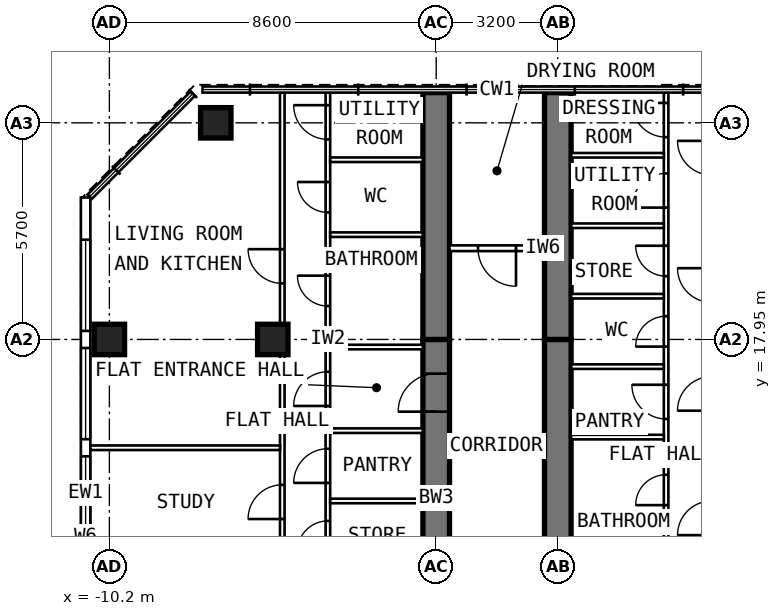
"""IFC4 building model, lengths in metres.
Left out: names, types, materials, properties, quantities, classifications, styles, units other than length and angle.
Written with IfcOpenShell. Run it as: python <this file> out.ifc"""

import sys

from ifc_helpers import new_model, si_unit, direction, frame, frame_2d, origin, origin_2d, place, context, subcontext, project, spatial, rectangle, extrude, element, fill, save


model = new_model("IFC4")
c1 = context("Model", 3, precision=1e-05, world=origin(), true_north=direction((0.0, 1.0)))
c2 = subcontext(c1, "Body", "Model", "MODEL_VIEW")
j1 = project(units=[si_unit("LENGTHUNIT", "METRE"), si_unit("PLANEANGLEUNIT", "RADIAN")], contexts=[c1])
p1 = place(None, origin())
s1 = spatial("IfcSite", under=j1, at=p1, CompositionType="ELEMENT")
p2 = place(p1, origin())
s2 = spatial("IfcBuilding", under=s1, at=p2, CompositionType="ELEMENT")
p3 = place(p2, frame((0.0, 0.0, 278.2)))
s3 = spatial("IfcBuildingStorey", under=s2, at=p3, CompositionType="ELEMENT", Elevation=278.2)
for number, where, z_axis, x_axis in (
    (1, (-10.2, 17.95, 0.0), (0.0, 0.0, 1.0), (0.0, 1.0, 0.0)),
    (2, (-7.4, 23.65, 0.0), (0.0, 0.0, 1.0), (0.0, 1.0, 0.0)),
    (3, (-5.9, 17.95, 0.0), (0.0, 0.0, 1.0), (0.0, 1.0, 0.0)),
):
    element("IfcColumn", number, at=place(p3, frame(where, z_axis=z_axis, x_axis=x_axis)), inside=s3, PredefinedType="COLUMN", context=c2, shape_type="SweptSolid", body=[
        extrude(rectangle(XDim=0.8, YDim=0.8, at=origin_2d()), origin(), (0.0, 0.0, 1.0), 3.6),
    ])
p4 = place(p3, frame((-1.6, 9.6, 0.0), z_axis=(0.0, 0.0, 1.0), x_axis=(0.0, 1.0, 0.0)))
e4 = element("IfcWall", 4, at=p4, inside=s3, PredefinedType="SHEAR", context=c2, shape_type="SweptSolid", body=[
    extrude(rectangle(XDim=8.35, YDim=0.7, at=frame_2d((4.175, 0.0))), origin(), (0.0, 0.0, 1.0), 3.6),
])
p5 = place(p4, frame((6.45, 0.0, 0.0)))
e5 = element("IfcOpeningElement", 5, at=p5, cuts=e4, PredefinedType="OPENING", context=c2, shape_type="SweptSolid", body=[
    extrude(rectangle(XDim=1.0, YDim=2.1, at=frame_2d((0.5, 1.05))), frame((0.0, 0.362, 0.0), z_axis=(0.0, -1.0, 0.0), x_axis=(1.0, 0.0, 0.0)), (0.0, 0.0, 1.0), 0.724),
])
p6 = place(p3, frame((-1.6, 17.95, 0.0), z_axis=(0.0, 0.0, 1.0), x_axis=(0.0, 1.0, 0.0)))
e6 = element("IfcWall", 6, at=p6, inside=s3, PredefinedType="SHEAR", context=c2, shape_type="SweptSolid", body=[
    extrude(rectangle(XDim=6.495, YDim=0.7, at=frame_2d((3.248, 0.0))), origin(), (0.0, 0.0, 1.0), 3.6),
])
p7 = place(p3, frame((1.6, 9.6, 0.0), z_axis=(0.0, 0.0, 1.0), x_axis=(0.0, 1.0, 0.0)))
e7 = element("IfcWall", 7, at=p7, inside=s3, PredefinedType="SHEAR", context=c2, shape_type="SweptSolid", body=[
    extrude(rectangle(XDim=8.35, YDim=0.7, at=frame_2d((4.175, 0.0))), origin(), (0.0, 0.0, 1.0), 3.6),
])
p8 = place(p7, frame((1.3, 0.0, 0.0)))
e8 = element("IfcOpeningElement", 8, at=p8, cuts=e7, PredefinedType="OPENING", context=c2, shape_type="SweptSolid", body=[
    extrude(rectangle(XDim=1.0, YDim=2.1, at=frame_2d((0.5, 1.05))), frame((0.0, 0.362, 0.0), z_axis=(0.0, -1.0, 0.0), x_axis=(1.0, 0.0, 0.0)), (0.0, 0.0, 1.0), 0.724),
])
p9 = place(p3, frame((1.6, 17.95, 0.0), z_axis=(0.0, 0.0, 1.0), x_axis=(0.0, 1.0, 0.0)))
e9 = element("IfcWall", 9, at=p9, inside=s3, PredefinedType="SHEAR", context=c2, shape_type="SweptSolid", body=[
    extrude(rectangle(XDim=6.495, YDim=0.7, at=frame_2d((3.248, 0.0))), origin(), (0.0, 0.0, 1.0), 3.6),
])
p10 = place(p3, frame((-10.825, 6.148, 0.0), z_axis=(0.0, 0.0, 1.0), x_axis=(0.0, 1.0, 0.0)))
e10 = element("IfcWall", 10, at=p10, inside=s3, PredefinedType="SOLIDWALL", context=c2, shape_type="SweptSolid", body=[
    extrude(rectangle(XDim=15.537, YDim=0.25, at=frame_2d((7.769, 0.0))), origin(), (0.0, 0.0, 1.0), 3.35),
])
p11 = place(p10, frame((0.627, 0.0, 0.6)))
e11 = element("IfcOpeningElement", 11, at=p11, cuts=e10, PredefinedType="OPENING", context=c2, shape_type="SweptSolid", body=[
    extrude(rectangle(XDim=2.4, YDim=2.0, at=frame_2d((1.2, 1.0))), frame((0.0, 0.137, 0.0), z_axis=(0.0, -1.0, 0.0), x_axis=(1.0, 0.0, 0.0)), (0.0, 0.0, 1.0), 0.274),
])
p12 = place(p10, frame((3.477, 0.0, 0.6)))
e12 = element("IfcOpeningElement", 12, at=p12, cuts=e10, PredefinedType="OPENING", context=c2, shape_type="SweptSolid", body=[
    extrude(rectangle(XDim=2.4, YDim=2.0, at=frame_2d((1.2, 1.0))), frame((0.0, 0.137, 0.0), z_axis=(0.0, -1.0, 0.0), x_axis=(1.0, 0.0, 0.0)), (0.0, 0.0, 1.0), 0.274),
])
p13 = place(p10, frame((6.327, 0.0, 0.6)))
e13 = element("IfcOpeningElement", 13, at=p13, cuts=e10, PredefinedType="OPENING", context=c2, shape_type="SweptSolid", body=[
    extrude(rectangle(XDim=2.4, YDim=2.0, at=frame_2d((1.2, 1.0))), frame((0.0, 0.137, 0.0), z_axis=(0.0, -1.0, 0.0), x_axis=(1.0, 0.0, 0.0)), (0.0, 0.0, 1.0), 0.274),
])
p14 = place(p10, frame((9.177, 0.0, 0.6)))
e14 = element("IfcOpeningElement", 14, at=p14, cuts=e10, PredefinedType="OPENING", context=c2, shape_type="SweptSolid", body=[
    extrude(rectangle(XDim=2.4, YDim=2.0, at=frame_2d((1.2, 1.0))), frame((0.0, 0.137, 0.0), z_axis=(0.0, -1.0, 0.0), x_axis=(1.0, 0.0, 0.0)), (0.0, 0.0, 1.0), 0.274),
])
p15 = place(p10, frame((12.027, 0.0, 0.6)))
e15 = element("IfcOpeningElement", 15, at=p15, cuts=e10, PredefinedType="OPENING", context=c2, shape_type="SweptSolid", body=[
    extrude(rectangle(XDim=2.4, YDim=2.0, at=frame_2d((1.2, 1.0))), frame((0.0, 0.137, 0.0), z_axis=(0.0, -1.0, 0.0), x_axis=(1.0, 0.0, 0.0)), (0.0, 0.0, 1.0), 0.274),
])
p16 = place(p3, frame((-4.45, 9.875, 0.0), z_axis=(0.0, 0.0, 1.0), x_axis=(0.0, 1.0, 0.0)))
e16 = element("IfcWall", 16, at=p16, inside=s3, PredefinedType="PARTITIONING", context=c2, shape_type="SweptSolid", body=[
    extrude(rectangle(XDim=14.57, YDim=0.12, at=frame_2d((7.285, 0.0))), origin(), (0.0, 0.0, 1.0), 3.35),
])
p17 = place(p16, frame((0.6, 0.0, 0.0)))
e17 = element("IfcOpeningElement", 17, at=p17, cuts=e16, PredefinedType="OPENING", context=c2, shape_type="SweptSolid", body=[
    extrude(rectangle(XDim=0.9, YDim=2.1, at=frame_2d((0.45, 1.05))), frame((0.0, 0.072, 0.0), z_axis=(0.0, -1.0, 0.0), x_axis=(1.0, 0.0, 0.0)), (0.0, 0.0, 1.0), 0.144),
])
p18 = place(p16, frame((2.5, 0.0, 0.0)))
e18 = element("IfcOpeningElement", 18, at=p18, cuts=e16, PredefinedType="OPENING", context=c2, shape_type="SweptSolid", body=[
    extrude(rectangle(XDim=0.8, YDim=2.1, at=frame_2d((0.4, 1.05))), frame((0.0, 0.072, 0.0), z_axis=(0.0, -1.0, 0.0), x_axis=(1.0, 0.0, 0.0)), (0.0, 0.0, 1.0), 0.144),
])
p19 = place(p16, frame((4.3, 0.0, 0.0)))
e19 = element("IfcOpeningElement", 19, at=p19, cuts=e16, PredefinedType="OPENING", context=c2, shape_type="SweptSolid", body=[
    extrude(rectangle(XDim=0.9, YDim=2.1, at=frame_2d((0.45, 1.05))), frame((0.0, 0.072, 0.0), z_axis=(0.0, -1.0, 0.0), x_axis=(1.0, 0.0, 0.0)), (0.0, 0.0, 1.0), 0.144),
])
p20 = place(p16, frame((6.325, 0.0, 0.0)))
e20 = element("IfcOpeningElement", 20, at=p20, cuts=e16, PredefinedType="OPENING", context=c2, shape_type="SweptSolid", body=[
    extrude(rectangle(XDim=0.9, YDim=2.1, at=frame_2d((0.45, 1.05))), frame((0.0, 0.072, 0.0), z_axis=(0.0, -1.0, 0.0), x_axis=(1.0, 0.0, 0.0)), (0.0, 0.0, 1.0), 0.144),
])
p21 = place(p16, frame((8.954, 0.0, 0.0)))
e21 = element("IfcOpeningElement", 21, at=p21, cuts=e16, PredefinedType="OPENING", context=c2, shape_type="SweptSolid", body=[
    extrude(rectangle(XDim=0.8, YDim=2.1, at=frame_2d((0.4, 1.05))), frame((0.0, 0.072, 0.0), z_axis=(0.0, -1.0, 0.0), x_axis=(1.0, 0.0, 0.0)), (0.0, 0.0, 1.0), 0.144),
])
p22 = place(p16, frame((11.418, 0.0, 0.0)))
e22 = element("IfcOpeningElement", 22, at=p22, cuts=e16, PredefinedType="OPENING", context=c2, shape_type="SweptSolid", body=[
    extrude(rectangle(XDim=0.8, YDim=2.1, at=frame_2d((0.4, 1.05))), frame((0.0, 0.072, 0.0), z_axis=(0.0, -1.0, 0.0), x_axis=(1.0, 0.0, 0.0)), (0.0, 0.0, 1.0), 0.144),
])
p23 = place(p16, frame((13.339, 0.0, 0.0)))
e23 = element("IfcOpeningElement", 23, at=p23, cuts=e16, PredefinedType="OPENING", context=c2, shape_type="SweptSolid", body=[
    extrude(rectangle(XDim=0.9, YDim=2.1, at=frame_2d((0.45, 1.05))), frame((0.0, 0.072, 0.0), z_axis=(0.0, -1.0, 0.0), x_axis=(1.0, 0.0, 0.0)), (0.0, 0.0, 1.0), 0.144),
])
p24 = place(p3, frame((-5.65, 9.6, 0.0), z_axis=(0.0, 0.0, 1.0), x_axis=(0.0, 1.0, 0.0)))
e24 = element("IfcWall", 24, at=p24, inside=s3, PredefinedType="PARTITIONING", context=c2, shape_type="SweptSolid", body=[
    extrude(rectangle(XDim=14.845, YDim=0.12, at=frame_2d((7.422, 0.0))), origin(), (0.0, 0.0, 1.0), 3.35),
])
p25 = place(p24, frame((1.075, 0.0, 0.0)))
e25 = element("IfcOpeningElement", 25, at=p25, cuts=e24, PredefinedType="OPENING", context=c2, shape_type="SweptSolid", body=[
    extrude(rectangle(XDim=0.9, YDim=2.1, at=frame_2d((0.45, 1.05))), frame((0.0, 0.072, 0.0), z_axis=(0.0, -1.0, 0.0), x_axis=(1.0, 0.0, 0.0)), (0.0, 0.0, 1.0), 0.144),
])
p26 = place(p24, frame((3.625, 0.0, 0.0)))
e26 = element("IfcOpeningElement", 26, at=p26, cuts=e24, PredefinedType="OPENING", context=c2, shape_type="SweptSolid", body=[
    extrude(rectangle(XDim=0.9, YDim=2.1, at=frame_2d((0.45, 1.05))), frame((0.0, 0.072, 0.0), z_axis=(0.0, -1.0, 0.0), x_axis=(1.0, 0.0, 0.0)), (0.0, 0.0, 1.0), 0.144),
])
p27 = place(p24, frame((9.825, 0.0, 0.0)))
e27 = element("IfcOpeningElement", 27, at=p27, cuts=e24, PredefinedType="OPENING", context=c2, shape_type="SweptSolid", body=[
    extrude(rectangle(XDim=0.9, YDim=2.1, at=frame_2d((0.45, 1.05))), frame((0.0, 0.072, 0.0), z_axis=(0.0, -1.0, 0.0), x_axis=(1.0, 0.0, 0.0)), (0.0, 0.0, 1.0), 0.144),
])
p28 = place(p3, frame((-5.71, 15.1, 0.0), z_axis=(0.0, 0.0, 1.0), x_axis=(-1.0, 0.0, 0.0)))
e28 = element("IfcWall", 28, at=p28, inside=s3, PredefinedType="PARTITIONING", context=c2, shape_type="SweptSolid", body=[
    extrude(rectangle(XDim=4.99, YDim=0.12, at=frame_2d((2.495, 0.0))), origin(), (0.0, 0.0, 1.0), 3.35),
])
for number, where, z_axis, x_axis in (
    (29, (-1.95, 13.7, 0.0), (0.0, 0.0, 1.0), (-1.0, 0.0, 0.0)),
    (30, (-1.95, 15.55, 0.0), (0.0, 0.0, 1.0), (-1.0, 0.0, 0.0)),
):
    element("IfcWall", number, at=place(p3, frame(where, z_axis=z_axis, x_axis=x_axis)), inside=s3, PredefinedType="PARTITIONING", context=c2, shape_type="SweptSolid", body=[
        extrude(rectangle(XDim=2.44, YDim=0.12, at=frame_2d((1.22, 0.0))), origin(), (0.0, 0.0, 1.0), 3.35),
    ])
p29 = place(p3, frame((-1.95, 17.75, 0.0), z_axis=(0.0, 0.0, 1.0), x_axis=(-1.0, 0.0, 0.0)))
e31 = element("IfcWall", 31, at=p29, inside=s3, PredefinedType="PARTITIONING", context=c2, shape_type="SweptSolid", body=[
    extrude(rectangle(XDim=2.44, YDim=0.12, at=frame_2d((1.22, 0.0))), origin(), (0.0, 0.0, 1.0), 2.45),
])
for number, where, z_axis, x_axis in (
    (32, (-1.95, 20.707, 0.0), (0.0, 0.0, 1.0), (-1.0, 0.0, 0.0)),
    (33, (-1.95, 22.678, 0.0), (0.0, 0.0, 1.0), (-1.0, 0.0, 0.0)),
):
    element("IfcWall", number, at=place(p3, frame(where, z_axis=z_axis, x_axis=x_axis)), inside=s3, PredefinedType="PARTITIONING", context=c2, shape_type="SweptSolid", body=[
        extrude(rectangle(XDim=2.44, YDim=0.12, at=frame_2d((1.22, 0.0))), origin(), (0.0, 0.0, 1.0), 3.35),
    ])
p30 = place(p3, frame((4.45, 9.875, 0.0), z_axis=(0.0, 0.0, 1.0), x_axis=(0.0, 1.0, 0.0)))
e34 = element("IfcWall", 34, at=p30, inside=s3, PredefinedType="PARTITIONING", context=c2, shape_type="SweptSolid", body=[
    extrude(rectangle(XDim=14.57, YDim=0.12, at=frame_2d((7.285, 0.0))), origin(), (0.0, 0.0, 1.0), 3.35),
])
p31 = place(p30, frame((0.975, 0.0, 0.0)))
e35 = element("IfcOpeningElement", 35, at=p31, cuts=e34, PredefinedType="OPENING", context=c2, shape_type="SweptSolid", body=[
    extrude(rectangle(XDim=0.9, YDim=2.1, at=frame_2d((0.45, 1.05))), frame((0.0, 0.072, 0.0), z_axis=(0.0, -1.0, 0.0), x_axis=(1.0, 0.0, 0.0)), (0.0, 0.0, 1.0), 0.144),
])
p32 = place(p30, frame((3.715, 0.0, 0.0)))
e36 = element("IfcOpeningElement", 36, at=p32, cuts=e34, PredefinedType="OPENING", context=c2, shape_type="SweptSolid", body=[
    extrude(rectangle(XDim=0.8, YDim=2.1, at=frame_2d((0.4, 1.05))), frame((0.0, 0.072, 0.0), z_axis=(0.0, -1.0, 0.0), x_axis=(1.0, 0.0, 0.0)), (0.0, 0.0, 1.0), 0.144),
])
p33 = place(p30, frame((5.983, 0.0, 0.0)))
e37 = element("IfcOpeningElement", 37, at=p33, cuts=e34, PredefinedType="OPENING", context=c2, shape_type="SweptSolid", body=[
    extrude(rectangle(XDim=0.9, YDim=2.1, at=frame_2d((0.45, 1.05))), frame((0.0, 0.072, 0.0), z_axis=(0.0, -1.0, 0.0), x_axis=(1.0, 0.0, 0.0)), (0.0, 0.0, 1.0), 0.144),
])
p34 = place(p30, frame((7.886, 0.0, 0.0)))
e38 = element("IfcOpeningElement", 38, at=p34, cuts=e34, PredefinedType="OPENING", context=c2, shape_type="SweptSolid", body=[
    extrude(rectangle(XDim=0.8, YDim=2.1, at=frame_2d((0.4, 1.05))), frame((0.0, 0.072, 0.0), z_axis=(0.0, -1.0, 0.0), x_axis=(1.0, 0.0, 0.0)), (0.0, 0.0, 1.0), 0.144),
])
p35 = place(p30, frame((9.74, 0.0, 0.0)))
e39 = element("IfcOpeningElement", 39, at=p35, cuts=e34, PredefinedType="OPENING", context=c2, shape_type="SweptSolid", body=[
    extrude(rectangle(XDim=0.8, YDim=2.1, at=frame_2d((0.4, 1.05))), frame((0.0, 0.072, 0.0), z_axis=(0.0, -1.0, 0.0), x_axis=(1.0, 0.0, 0.0)), (0.0, 0.0, 1.0), 0.144),
])
p36 = place(p30, frame((11.544, 0.0, 0.0)))
e40 = element("IfcOpeningElement", 40, at=p36, cuts=e34, PredefinedType="OPENING", context=c2, shape_type="SweptSolid", body=[
    extrude(rectangle(XDim=0.9, YDim=2.1, at=frame_2d((0.45, 1.05))), frame((0.0, 0.072, 0.0), z_axis=(0.0, -1.0, 0.0), x_axis=(1.0, 0.0, 0.0)), (0.0, 0.0, 1.0), 0.144),
])
p37 = place(p30, frame((13.398, 0.0, 0.0)))
e41 = element("IfcOpeningElement", 41, at=p37, cuts=e34, PredefinedType="OPENING", context=c2, shape_type="SweptSolid", body=[
    extrude(rectangle(XDim=0.9, YDim=2.1, at=frame_2d((0.45, 1.05))), frame((0.0, 0.072, 0.0), z_axis=(0.0, -1.0, 0.0), x_axis=(1.0, 0.0, 0.0)), (0.0, 0.0, 1.0), 0.144),
])
for number, where, z_axis, x_axis in (
    (42, (1.95, 15.381, 0.0), (0.0, 0.0, 1.0), (1.0, 0.0, 0.0)),
    (43, (1.95, 17.235, 0.0), (0.0, 0.0, 1.0), (1.0, 0.0, 0.0)),
    (44, (1.95, 19.088, 0.0), (0.0, 0.0, 1.0), (1.0, 0.0, 0.0)),
    (45, (1.95, 20.942, 0.0), (0.0, 0.0, 1.0), (1.0, 0.0, 0.0)),
    (46, (1.95, 22.796, 0.0), (0.0, 0.0, 1.0), (1.0, 0.0, 0.0)),
):
    element("IfcWall", number, at=place(p3, frame(where, z_axis=z_axis, x_axis=x_axis)), inside=s3, PredefinedType="PARTITIONING", context=c2, shape_type="SweptSolid", body=[
        extrude(rectangle(XDim=2.44, YDim=0.12, at=frame_2d((1.22, 0.0))), origin(), (0.0, 0.0, 1.0), 3.35),
    ])
p38 = place(p3, frame((1.25, 20.35, 0.0), z_axis=(0.0, 0.0, 1.0), x_axis=(-1.0, 0.0, 0.0)))
e47 = element("IfcWall", 47, at=p38, inside=s3, PredefinedType="PARTITIONING", context=c2, shape_type="SweptSolid", body=[
    extrude(rectangle(XDim=2.5, YDim=0.15, at=frame_2d((1.25, 0.0))), origin(), (0.0, 0.0, 1.0), 3.35),
])
p39 = place(p38, frame((0.75, 0.0, 0.0)))
e48 = element("IfcOpeningElement", 48, at=p39, cuts=e47, PredefinedType="OPENING", context=c2, shape_type="SweptSolid", body=[
    extrude(rectangle(XDim=1.0, YDim=2.1, at=frame_2d((0.5, 1.05))), frame((0.0, 0.087, 0.0), z_axis=(0.0, -1.0, 0.0), x_axis=(1.0, 0.0, 0.0)), (0.0, 0.0, 1.0), 0.174),
])
p40 = place(p13, origin())
e49 = element("IfcWindow", 49, at=p40, inside=s3, PartitioningType="SINGLE_PANEL", PredefinedType="WINDOW", context=c2, shape_type="SweptSolid", body=[
    extrude(rectangle(XDim=2.4, YDim=2.0, at=frame_2d((1.2, 1.0))), frame((0.0, 0.03, 0.0), z_axis=(0.0, -1.0, 0.0), x_axis=(1.0, 0.0, 0.0)), (0.0, 0.0, 1.0), 0.06),
])
fill(e13, e49)
p41 = place(p14, origin())
e50 = element("IfcWindow", 50, at=p41, inside=s3, PartitioningType="SINGLE_PANEL", PredefinedType="WINDOW", context=c2, shape_type="SweptSolid", body=[
    extrude(rectangle(XDim=2.4, YDim=2.0, at=frame_2d((1.2, 1.0))), frame((0.0, 0.03, 0.0), z_axis=(0.0, -1.0, 0.0), x_axis=(1.0, 0.0, 0.0)), (0.0, 0.0, 1.0), 0.06),
])
fill(e14, e50)
p42 = place(p15, origin())
e51 = element("IfcWindow", 51, at=p42, inside=s3, PartitioningType="SINGLE_PANEL", PredefinedType="WINDOW", context=c2, shape_type="SweptSolid", body=[
    extrude(rectangle(XDim=2.4, YDim=2.0, at=frame_2d((1.2, 1.0))), frame((0.0, 0.03, 0.0), z_axis=(0.0, -1.0, 0.0), x_axis=(1.0, 0.0, 0.0)), (0.0, 0.0, 1.0), 0.06),
])
fill(e15, e51)
p43 = place(p5, origin())
e52 = element("IfcDoor", 52, at=p43, inside=s3, OperationType="SINGLE_SWING_LEFT", PredefinedType="DOOR", context=c2, shape_type="SweptSolid", body=[
    extrude(rectangle(XDim=1.0, YDim=2.1, at=frame_2d((0.5, 1.05))), frame((0.0, 0.1, 0.0), z_axis=(0.0, -1.0, 0.0), x_axis=(1.0, 0.0, 0.0)), (0.0, 0.0, 1.0), 0.2),
])
fill(e5, e52)
p44 = place(p26, origin())
e53 = element("IfcDoor", 53, at=p44, inside=s3, OperationType="SINGLE_SWING_LEFT", PredefinedType="DOOR", context=c2, shape_type="SweptSolid", body=[
    extrude(rectangle(XDim=0.9, YDim=2.1, at=frame_2d((0.45, 1.05))), frame((0.0, 0.025, 0.0), z_axis=(0.0, -1.0, 0.0), x_axis=(1.0, 0.0, 0.0)), (0.0, 0.0, 1.0), 0.05),
])
fill(e26, e53)
p45 = place(p27, origin())
e54 = element("IfcDoor", 54, at=p45, inside=s3, OperationType="SINGLE_SWING_RIGHT", PredefinedType="DOOR", context=c2, shape_type="SweptSolid", body=[
    extrude(rectangle(XDim=0.9, YDim=2.1, at=frame_2d((0.45, 1.05))), frame((0.0, 0.025, 0.0), z_axis=(0.0, -1.0, 0.0), x_axis=(1.0, 0.0, 0.0)), (0.0, 0.0, 1.0), 0.05),
])
fill(e27, e54)
p46 = place(p18, origin())
e55 = element("IfcDoor", 55, at=p46, inside=s3, OperationType="SINGLE_SWING_LEFT", PredefinedType="DOOR", context=c2, shape_type="SweptSolid", body=[
    extrude(rectangle(XDim=0.8, YDim=2.1, at=frame_2d((0.4, 1.05))), frame((0.0, 0.025, 0.0), z_axis=(0.0, -1.0, 0.0), x_axis=(1.0, 0.0, 0.0)), (0.0, 0.0, 1.0), 0.05),
])
fill(e18, e55)
p47 = place(p19, origin())
e56 = element("IfcDoor", 56, at=p47, inside=s3, OperationType="SINGLE_SWING_LEFT", PredefinedType="DOOR", context=c2, shape_type="SweptSolid", body=[
    extrude(rectangle(XDim=0.9, YDim=2.1, at=frame_2d((0.45, 1.05))), frame((0.0, 0.025, 0.0), z_axis=(0.0, -1.0, 0.0), x_axis=(1.0, 0.0, 0.0)), (0.0, 0.0, 1.0), 0.05),
])
fill(e19, e56)
p48 = place(p20, origin())
e57 = element("IfcDoor", 57, at=p48, inside=s3, OperationType="SINGLE_SWING_LEFT", PredefinedType="DOOR", context=c2, shape_type="SweptSolid", body=[
    extrude(rectangle(XDim=0.9, YDim=2.1, at=frame_2d((0.45, 1.05))), frame((0.0, 0.025, 0.0), z_axis=(0.0, -1.0, 0.0), x_axis=(1.0, 0.0, 0.0)), (0.0, 0.0, 1.0), 0.05),
])
fill(e20, e57)
p49 = place(p21, origin())
e58 = element("IfcDoor", 58, at=p49, inside=s3, OperationType="SINGLE_SWING_RIGHT", PredefinedType="DOOR", context=c2, shape_type="SweptSolid", body=[
    extrude(rectangle(XDim=0.8, YDim=2.1, at=frame_2d((0.4, 1.05))), frame((0.0, 0.025, 0.0), z_axis=(0.0, -1.0, 0.0), x_axis=(1.0, 0.0, 0.0)), (0.0, 0.0, 1.0), 0.05),
])
fill(e21, e58)
p50 = place(p22, origin())
e59 = element("IfcDoor", 59, at=p50, inside=s3, OperationType="SINGLE_SWING_RIGHT", PredefinedType="DOOR", context=c2, shape_type="SweptSolid", body=[
    extrude(rectangle(XDim=0.8, YDim=2.1, at=frame_2d((0.4, 1.05))), frame((0.0, 0.025, 0.0), z_axis=(0.0, -1.0, 0.0), x_axis=(1.0, 0.0, 0.0)), (0.0, 0.0, 1.0), 0.05),
])
fill(e22, e59)
p51 = place(p23, origin())
e60 = element("IfcDoor", 60, at=p51, inside=s3, OperationType="SINGLE_SWING_RIGHT", PredefinedType="DOOR", context=c2, shape_type="SweptSolid", body=[
    extrude(rectangle(XDim=0.9, YDim=2.1, at=frame_2d((0.45, 1.05))), frame((0.0, 0.025, 0.0), z_axis=(0.0, -1.0, 0.0), x_axis=(1.0, 0.0, 0.0)), (0.0, 0.0, 1.0), 0.05),
])
fill(e23, e60)
p52 = place(p32, origin())
e61 = element("IfcDoor", 61, at=p52, inside=s3, OperationType="SINGLE_SWING_LEFT", PredefinedType="DOOR", context=c2, shape_type="SweptSolid", body=[
    extrude(rectangle(XDim=0.8, YDim=2.1, at=frame_2d((0.4, 1.05))), frame((0.0, 0.025, 0.0), z_axis=(0.0, -1.0, 0.0), x_axis=(1.0, 0.0, 0.0)), (0.0, 0.0, 1.0), 0.05),
])
fill(e36, e61)
p53 = place(p33, origin())
e62 = element("IfcDoor", 62, at=p53, inside=s3, OperationType="SINGLE_SWING_RIGHT", PredefinedType="DOOR", context=c2, shape_type="SweptSolid", body=[
    extrude(rectangle(XDim=0.9, YDim=2.1, at=frame_2d((0.45, 1.05))), frame((0.0, 0.025, 0.0), z_axis=(0.0, -1.0, 0.0), x_axis=(1.0, 0.0, 0.0)), (0.0, 0.0, 1.0), 0.05),
])
fill(e37, e62)
p54 = place(p34, origin())
e63 = element("IfcDoor", 63, at=p54, inside=s3, OperationType="SINGLE_SWING_LEFT", PredefinedType="DOOR", context=c2, shape_type="SweptSolid", body=[
    extrude(rectangle(XDim=0.8, YDim=2.1, at=frame_2d((0.4, 1.05))), frame((0.0, 0.025, 0.0), z_axis=(0.0, -1.0, 0.0), x_axis=(1.0, 0.0, 0.0)), (0.0, 0.0, 1.0), 0.05),
])
fill(e38, e63)
p55 = place(p35, origin())
e64 = element("IfcDoor", 64, at=p55, inside=s3, OperationType="SINGLE_SWING_RIGHT", PredefinedType="DOOR", context=c2, shape_type="SweptSolid", body=[
    extrude(rectangle(XDim=0.8, YDim=2.1, at=frame_2d((0.4, 1.05))), frame((0.0, 0.025, 0.0), z_axis=(0.0, -1.0, 0.0), x_axis=(1.0, 0.0, 0.0)), (0.0, 0.0, 1.0), 0.05),
])
fill(e39, e64)
p56 = place(p36, origin())
e65 = element("IfcDoor", 65, at=p56, inside=s3, OperationType="SINGLE_SWING_LEFT", PredefinedType="DOOR", context=c2, shape_type="SweptSolid", body=[
    extrude(rectangle(XDim=0.9, YDim=2.1, at=frame_2d((0.45, 1.05))), frame((0.0, 0.025, 0.0), z_axis=(0.0, -1.0, 0.0), x_axis=(1.0, 0.0, 0.0)), (0.0, 0.0, 1.0), 0.05),
])
fill(e40, e65)
p57 = place(p37, origin())
e66 = element("IfcDoor", 66, at=p57, inside=s3, OperationType="SINGLE_SWING_RIGHT", PredefinedType="DOOR", context=c2, shape_type="SweptSolid", body=[
    extrude(rectangle(XDim=0.9, YDim=2.1, at=frame_2d((0.45, 1.05))), frame((0.0, 0.025, 0.0), z_axis=(0.0, -1.0, 0.0), x_axis=(1.0, 0.0, 0.0)), (0.0, 0.0, 1.0), 0.05),
])
fill(e41, e66)
p58 = place(p39, origin())
e67 = element("IfcDoor", 67, at=p58, inside=s3, OperationType="SINGLE_SWING_LEFT", PredefinedType="DOOR", context=c2, shape_type="SweptSolid", body=[
    extrude(rectangle(XDim=1.0, YDim=2.1, at=frame_2d((0.5, 1.05))), frame((0.0, 0.025, 0.0), z_axis=(0.0, -1.0, 0.0), x_axis=(1.0, 0.0, 0.0)), (0.0, 0.0, 1.0), 0.05),
])
fill(e48, e67)
save(model, sys.argv[1])
